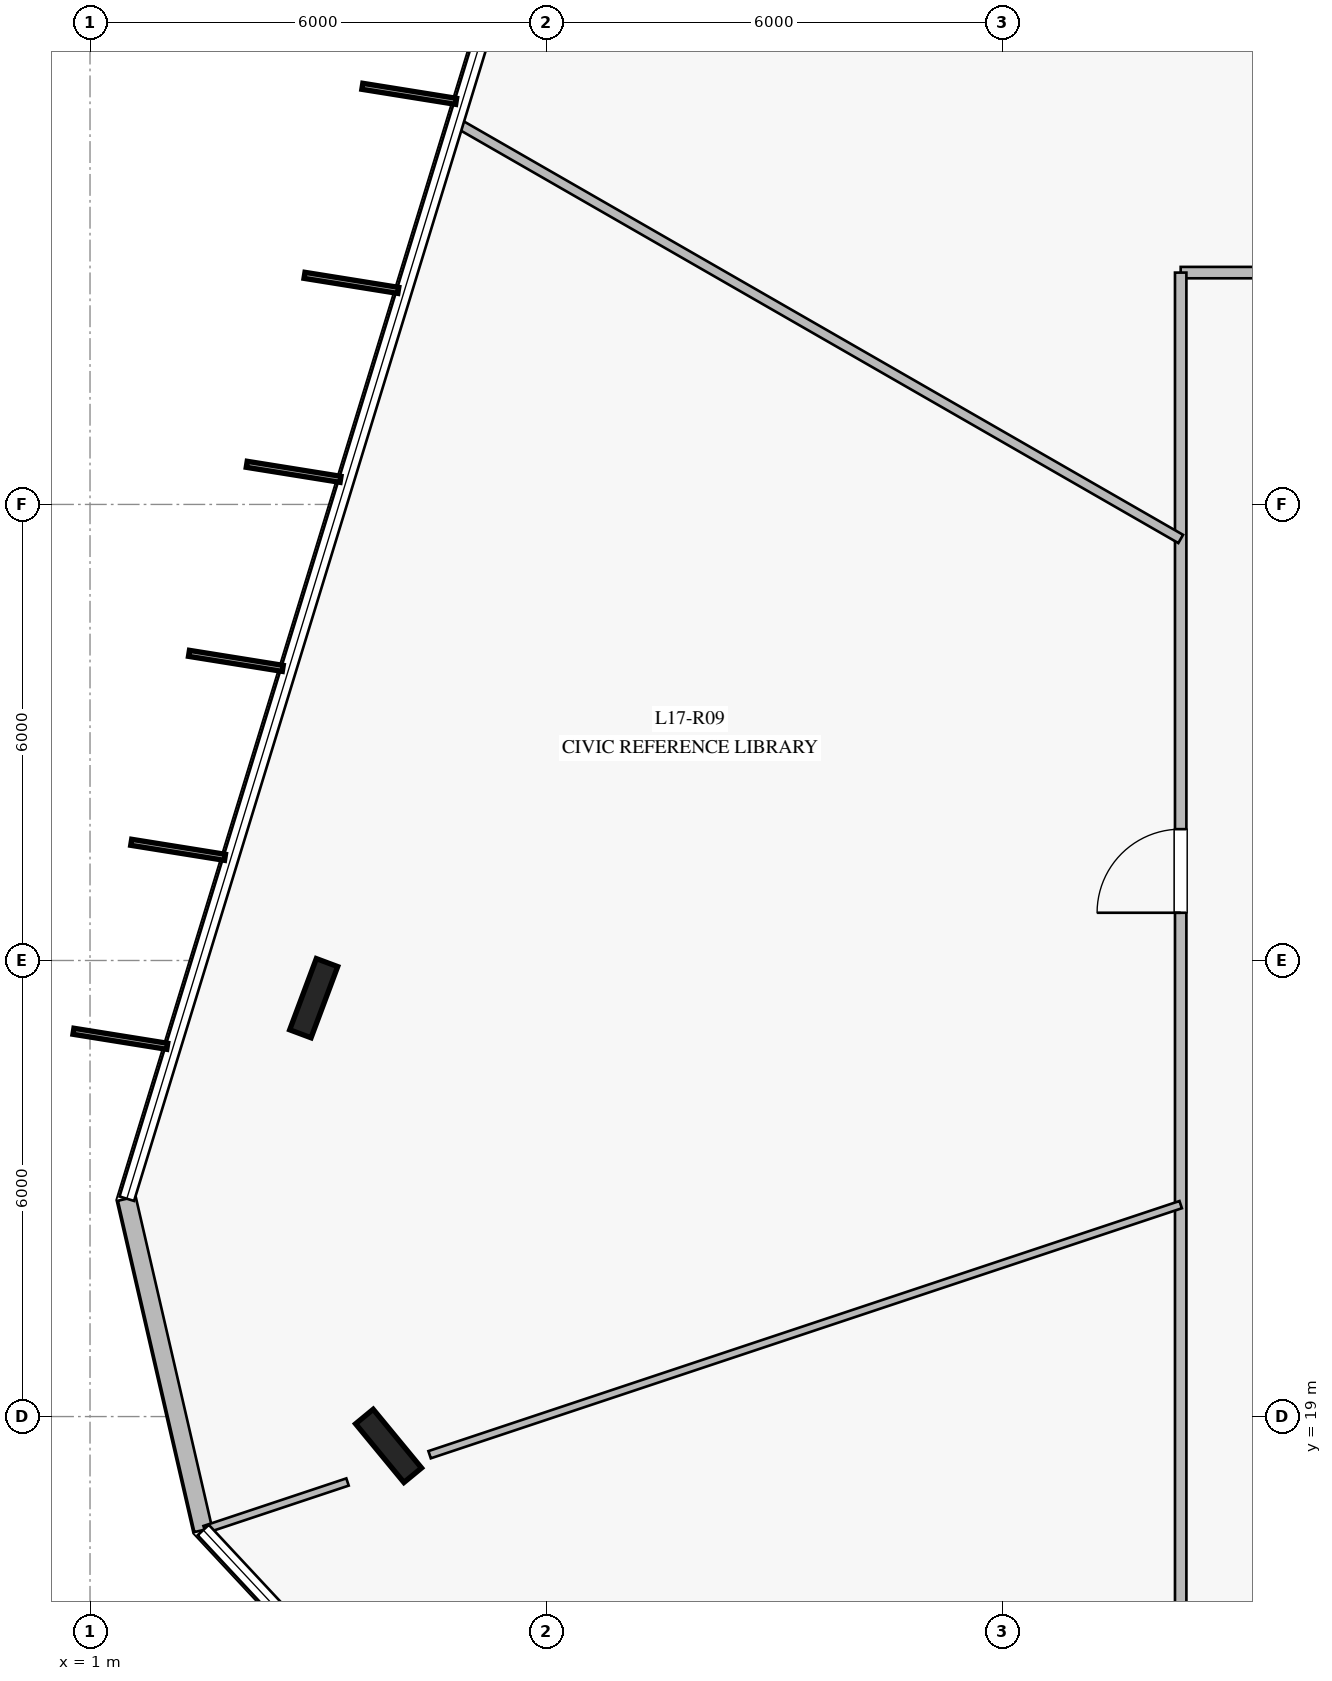
"""IFC4 building model, lengths in metres.
Left out: names, types, materials, properties, quantities, classifications, styles, units other than length and angle.
Written with IfcOpenShell. Run it as: python <this file> out.ifc"""

import sys

from ifc_helpers import new_model, si_unit, direction, frame, frame_2d, origin, origin_2d, place, context, subcontext, project, spatial, rectangle, i_section, extrude, element, fill, save


model = new_model("IFC4")
c1 = context("Model", 3, precision=1e-05, world=origin(), true_north=direction((0.0, 1.0)))
c2 = subcontext(c1, "Body", "Model", "MODEL_VIEW")
j1 = project(units=[si_unit("LENGTHUNIT", "METRE"), si_unit("PLANEANGLEUNIT", "RADIAN")], contexts=[c1])
p1 = place(None, origin())
s1 = spatial("IfcSite", under=j1, at=p1, CompositionType="ELEMENT")
p2 = place(p1, origin())
s2 = spatial("IfcBuilding", under=s1, at=p2, CompositionType="ELEMENT")
p3 = place(p2, frame((0.0, 0.0, 72.0)))
s3 = spatial("IfcBuildingStorey", under=s2, at=p3, CompositionType="ELEMENT", Elevation=72.0)
for number, where, z_axis, x_axis in (
    (1, (3.943, 24.504, 0.0), (0.0, 0.0, 1.0), (0.35, 0.937, 0.0)),
    (2, (4.928, 18.614, 0.0), (0.0, 0.0, 1.0), (-0.636, 0.772, 0.0)),
):
    element("IfcColumn", number, at=place(p3, frame(where, z_axis=z_axis, x_axis=x_axis)), inside=s3, PredefinedType="COLUMN", context=c2, shape_type="SweptSolid", body=[
        extrude(i_section(OverallWidth=0.3, OverallDepth=1.0, WebThickness=0.019, FlangeThickness=0.036, at=origin_2d()), origin(), (0.0, 0.0, 1.0), 4.0),
    ])
p4 = place(p3, frame((1.484, 21.866, 0.0), z_axis=(0.0, 0.0, 1.0), x_axis=(0.224903350388, -0.974381076881, 0.0)))
e3 = element("IfcWall", 3, at=p4, inside=s3, PredefinedType="STANDARD", context=c2, shape_type="SweptSolid", body=[
    extrude(rectangle(XDim=4.473, YDim=0.24, at=frame_2d((2.237, 0.0))), origin(), (0.0, 0.0, 1.0), 3.76),
])
p5 = place(p3, frame((15.35, 34.05, 0.0), z_axis=(0.0, 0.0, 1.0), x_axis=(1.0, 0.0, 0.0)))
e4 = element("IfcWall", 4, at=p5, inside=s3, PredefinedType="PARTITIONING", context=c2, shape_type="SweptSolid", body=[
    extrude(rectangle(XDim=19.3, YDim=0.15, at=frame_2d((9.65, 0.0))), origin(), (0.0, 0.0, 1.0), 3.21),
])
p6 = place(p5, frame((16.835, 0.0, 0.0)))
e5 = element("IfcOpeningElement", 5, at=p6, cuts=e4, PredefinedType="OPENING", context=c2, shape_type="SweptSolid", body=[
    extrude(rectangle(XDim=1.1, YDim=2.2, at=frame_2d((0.55, 1.1))), frame((0.0, 0.085, 0.0), z_axis=(0.0, -1.0, 0.0), x_axis=(1.0, 0.0, 0.0)), (0.0, 0.0, 1.0), 0.17),
])
p7 = place(p5, frame((11.052, 0.0, 0.0)))
e6 = element("IfcOpeningElement", 6, at=p7, cuts=e4, PredefinedType="OPENING", context=c2, shape_type="SweptSolid", body=[
    extrude(rectangle(XDim=1.1, YDim=2.2, at=frame_2d((0.55, 1.1))), frame((0.0, 0.085, 0.0), z_axis=(0.0, -1.0, 0.0), x_axis=(1.0, 0.0, 0.0)), (0.0, 0.0, 1.0), 0.17),
])
p8 = place(p5, frame((3.318, 0.0, 0.0)))
e7 = element("IfcOpeningElement", 7, at=p8, cuts=e4, PredefinedType="OPENING", context=c2, shape_type="SweptSolid", body=[
    extrude(rectangle(XDim=1.1, YDim=2.2, at=frame_2d((0.55, 1.1))), frame((0.0, 0.085, 0.0), z_axis=(0.0, -1.0, 0.0), x_axis=(1.0, 0.0, 0.0)), (0.0, 0.0, 1.0), 0.17),
])
p9 = place(p3, frame((15.35, 15.95, 0.0), z_axis=(0.0, 0.0, 1.0), x_axis=(0.0, 1.0, 0.0)))
e8 = element("IfcWall", 8, at=p9, inside=s3, PredefinedType="PARTITIONING", context=c2, shape_type="SweptSolid", body=[
    extrude(rectangle(XDim=18.1, YDim=0.15, at=frame_2d((9.05, 0.0))), origin(), (0.0, 0.0, 1.0), 3.21),
])
p10 = place(p9, frame((9.678, 0.0, 0.0)))
e9 = element("IfcOpeningElement", 9, at=p10, cuts=e8, PredefinedType="OPENING", context=c2, shape_type="SweptSolid", body=[
    extrude(rectangle(XDim=1.1, YDim=2.2, at=frame_2d((0.55, 1.1))), frame((0.0, 0.085, 0.0), z_axis=(0.0, -1.0, 0.0), x_axis=(1.0, 0.0, 0.0)), (0.0, 0.0, 1.0), 0.17),
])
p11 = place(p3, frame((15.35, 30.546, 0.0), z_axis=(0.0, 0.0, 1.0), x_axis=(-0.866962496214, 0.498373384279, 0.0)))
e10 = element("IfcWall", 10, at=p11, inside=s3, PredefinedType="PARTITIONING", context=c2, shape_type="SweptSolid", body=[
    extrude(rectangle(XDim=10.982, YDim=0.125, at=frame_2d((5.491, 0.0))), origin(), (0.0, 0.0, 1.0), 3.05),
])
p12 = place(p3, frame((15.35, 21.788, 0.0), z_axis=(0.0, 0.0, 1.0), x_axis=(-0.948798093557, -0.315883170906, 0.0)))
e11 = element("IfcWall", 11, at=p12, inside=s3, PredefinedType="MOVABLE", context=c2, shape_type="SweptSolid", body=[
    extrude(rectangle(XDim=10.415, YDim=0.1, at=frame_2d((5.208, 0.0))), origin(), (0.0, 0.0, 1.0), 3.21),
])
p13 = place(p3, frame((4.388, 18.139, 0.0), z_axis=(0.0, 0.0, 1.0), x_axis=(-0.948781826694, -0.315932026447, 0.0)))
e12 = element("IfcWall", 12, at=p13, inside=s3, PredefinedType="MOVABLE", context=c2, shape_type="SweptSolid", body=[
    extrude(rectangle(XDim=1.981, YDim=0.1, at=frame_2d((0.991, 0.0))), origin(), (0.0, 0.0, 1.0), 3.76),
])
p14 = place(p10, origin())
e13 = element("IfcDoor", 13, at=p14, inside=s3, OperationType="SINGLE_SWING_LEFT", PredefinedType="DOOR", context=c2, shape_type="SweptSolid", body=[
    extrude(rectangle(XDim=1.1, YDim=2.2, at=frame_2d((0.55, 1.1))), frame((0.0, 0.025, 0.0), z_axis=(0.0, -1.0, 0.0), x_axis=(1.0, 0.0, 0.0)), (0.0, 0.0, 1.0), 0.05),
])
fill(e9, e13)
save(model, sys.argv[1])
